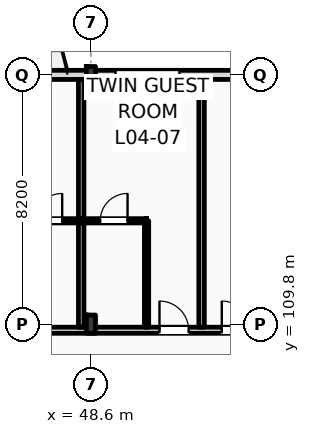
"""IFC4 building model, lengths in metres.
Left out: names, types, materials, properties, quantities, classifications, styles, units other than length and angle.
Written with IfcOpenShell. Run it as: python <this file> out.ifc"""

import sys

from ifc_helpers import new_model, si_unit, direction, frame, frame_2d, origin, origin_2d, place, context, subcontext, project, spatial, rectangle, i_section, extrude, element, fill, save


model = new_model("IFC4")
c1 = context("Model", 3, precision=1e-05, world=origin(), true_north=direction((0.0, 1.0)))
c2 = subcontext(c1, "Body", "Model", "MODEL_VIEW")
j1 = project(units=[si_unit("LENGTHUNIT", "METRE"), si_unit("PLANEANGLEUNIT", "RADIAN")], contexts=[c1])
p1 = place(None, origin())
s1 = spatial("IfcSite", under=j1, at=p1, CompositionType="ELEMENT")
p2 = place(p1, origin())
s2 = spatial("IfcBuilding", under=s1, at=p2, CompositionType="ELEMENT")
p3 = place(p2, frame((0.0, 0.0, 20.4)))
s3 = spatial("IfcBuildingStorey", under=s2, at=p3, CompositionType="ELEMENT", Elevation=20.4)
p4 = place(p3, frame((48.6, 109.8, 0.0), z_axis=(0.0, 0.0, 1.0), x_axis=(1.0, 0.0, 0.0)))
e1 = element("IfcColumn", 1, at=p4, inside=s3, PredefinedType="COLUMN", context=c2, shape_type="SweptSolid", body=[
    extrude(i_section(OverallWidth=0.3, OverallDepth=0.6, WebThickness=0.015, FlangeThickness=0.03, FilletRadius=0.027, at=origin_2d()), origin(), (0.0, 0.0, 1.0), 4.2),
])
p5 = place(p3, frame((48.6, 118.0, 0.0), z_axis=(0.0, 0.0, 1.0), x_axis=(1.0, 0.0, 0.0)))
e2 = element("IfcColumn", 2, at=p5, inside=s3, PredefinedType="COLUMN", context=c2, shape_type="SweptSolid", body=[
    extrude(i_section(OverallWidth=0.3, OverallDepth=0.55, WebThickness=0.015, FlangeThickness=0.029, FilletRadius=0.027, at=origin_2d()), origin(), (0.0, 0.0, 1.0), 4.2),
])
p6 = place(p3, frame((22.5, 118.0, 0.0), z_axis=(0.0, 0.0, 1.0), x_axis=(1.0, 0.0, 0.0)))
e3 = element("IfcWall", 3, at=p6, inside=s3, PredefinedType="STANDARD", context=c2, shape_type="SweptSolid", body=[
    extrude(rectangle(XDim=97.5, YDim=0.3, at=frame_2d((48.75, 0.0))), origin(), (0.0, 0.0, 1.0), 3.38),
])
p7 = place(p6, frame((0.91, 0.0, 0.9)))
e4 = element("IfcOpeningElement", 4, at=p7, cuts=e3, PredefinedType="OPENING", context=c2, shape_type="SweptSolid", body=[
    extrude(rectangle(XDim=0.9, YDim=1.8, at=frame_2d((0.45, 0.9))), frame((0.0, 0.16, 0.0), z_axis=(0.0, -1.0, 0.0), x_axis=(1.0, 0.0, 0.0)), (0.0, 0.0, 1.0), 0.32),
])
p8 = place(p6, frame((6.36, 0.0, 0.0)))
e5 = element("IfcOpeningElement", 5, at=p8, cuts=e3, PredefinedType="OPENING", context=c2, shape_type="SweptSolid", body=[
    extrude(rectangle(XDim=1.2, YDim=2.25, at=frame_2d((0.6, 1.125))), frame((0.0, 0.16, 0.0), z_axis=(0.0, -1.0, 0.0), x_axis=(1.0, 0.0, 0.0)), (0.0, 0.0, 1.0), 0.32),
])
p9 = place(p6, frame((11.41, 0.0, 0.9)))
e6 = element("IfcOpeningElement", 6, at=p9, cuts=e3, PredefinedType="OPENING", context=c2, shape_type="SweptSolid", body=[
    extrude(rectangle(XDim=1.1, YDim=1.9, at=frame_2d((0.55, 0.95))), frame((0.0, 0.16, 0.0), z_axis=(0.0, -1.0, 0.0), x_axis=(1.0, 0.0, 0.0)), (0.0, 0.0, 1.0), 0.32),
])
p10 = place(p6, frame((14.335, 0.0, 0.9)))
e7 = element("IfcOpeningElement", 7, at=p10, cuts=e3, PredefinedType="OPENING", context=c2, shape_type="SweptSolid", body=[
    extrude(rectangle(XDim=1.65, YDim=1.95, at=frame_2d((0.825, 0.975))), frame((0.0, 0.16, 0.0), z_axis=(0.0, -1.0, 0.0), x_axis=(1.0, 0.0, 0.0)), (0.0, 0.0, 1.0), 0.32),
])
p11 = place(p6, frame((19.26, 0.0, 0.9)))
e8 = element("IfcOpeningElement", 8, at=p11, cuts=e3, PredefinedType="OPENING", context=c2, shape_type="SweptSolid", body=[
    extrude(rectangle(XDim=1.35, YDim=2.0, at=frame_2d((0.675, 1.0))), frame((0.0, 0.16, 0.0), z_axis=(0.0, -1.0, 0.0), x_axis=(1.0, 0.0, 0.0)), (0.0, 0.0, 1.0), 0.32),
])
p12 = place(p6, frame((22.8, 0.0, 0.0)))
e9 = element("IfcOpeningElement", 9, at=p12, cuts=e3, PredefinedType="OPENING", context=c2, shape_type="SweptSolid", body=[
    extrude(rectangle(XDim=1.2, YDim=2.25, at=frame_2d((0.6, 1.125))), frame((0.0, 0.16, 0.0), z_axis=(0.0, -1.0, 0.0), x_axis=(1.0, 0.0, 0.0)), (0.0, 0.0, 1.0), 0.32),
])
p13 = place(p6, frame((26.91, 0.0, 0.9)))
e10 = element("IfcOpeningElement", 10, at=p13, cuts=e3, PredefinedType="OPENING", context=c2, shape_type="SweptSolid", body=[
    extrude(rectangle(XDim=2.1, YDim=2.1, at=frame_2d((1.05, 1.05))), frame((0.0, 0.16, 0.0), z_axis=(0.0, -1.0, 0.0), x_axis=(1.0, 0.0, 0.0)), (0.0, 0.0, 1.0), 0.32),
])
p14 = place(p6, frame((30.835, 0.0, 0.9)))
e11 = element("IfcOpeningElement", 11, at=p14, cuts=e3, PredefinedType="OPENING", context=c2, shape_type="SweptSolid", body=[
    extrude(rectangle(XDim=2.25, YDim=2.15, at=frame_2d((1.125, 1.075))), frame((0.0, 0.16, 0.0), z_axis=(0.0, -1.0, 0.0), x_axis=(1.0, 0.0, 0.0)), (0.0, 0.0, 1.0), 0.32),
])
p15 = place(p6, frame((34.96, 0.0, 0.9)))
e12 = element("IfcOpeningElement", 12, at=p15, cuts=e3, PredefinedType="OPENING", context=c2, shape_type="SweptSolid", body=[
    extrude(rectangle(XDim=2.4, YDim=2.2, at=frame_2d((1.2, 1.1))), frame((0.0, 0.16, 0.0), z_axis=(0.0, -1.0, 0.0), x_axis=(1.0, 0.0, 0.0)), (0.0, 0.0, 1.0), 0.32),
])
p16 = place(p6, frame((39.0, 0.0, 0.0)))
e13 = element("IfcOpeningElement", 13, at=p16, cuts=e3, PredefinedType="OPENING", context=c2, shape_type="SweptSolid", body=[
    extrude(rectangle(XDim=1.2, YDim=2.25, at=frame_2d((0.6, 1.125))), frame((0.0, 0.16, 0.0), z_axis=(0.0, -1.0, 0.0), x_axis=(1.0, 0.0, 0.0)), (0.0, 0.0, 1.0), 0.32),
])
p17 = place(p6, frame((43.21, 0.0, 0.9)))
e14 = element("IfcOpeningElement", 14, at=p17, cuts=e3, PredefinedType="OPENING", context=c2, shape_type="SweptSolid", body=[
    extrude(rectangle(XDim=2.7, YDim=2.3, at=frame_2d((1.35, 1.15))), frame((0.0, 0.16, 0.0), z_axis=(0.0, -1.0, 0.0), x_axis=(1.0, 0.0, 0.0)), (0.0, 0.0, 1.0), 0.32),
])
p18 = place(p6, frame((47.335, 0.0, 0.9)))
e15 = element("IfcOpeningElement", 15, at=p18, cuts=e3, PredefinedType="OPENING", context=c2, shape_type="SweptSolid", body=[
    extrude(rectangle(XDim=1.35, YDim=2.3, at=frame_2d((0.675, 1.15))), frame((0.0, 0.16, 0.0), z_axis=(0.0, -1.0, 0.0), x_axis=(1.0, 0.0, 0.0)), (0.0, 0.0, 1.0), 0.32),
])
p19 = place(p6, frame((52.74, 0.0, 0.0)))
e16 = element("IfcOpeningElement", 16, at=p19, cuts=e3, PredefinedType="OPENING", context=c2, shape_type="SweptSolid", body=[
    extrude(rectangle(XDim=1.2, YDim=2.25, at=frame_2d((0.6, 1.125))), frame((0.0, 0.16, 0.0), z_axis=(0.0, -1.0, 0.0), x_axis=(1.0, 0.0, 0.0)), (0.0, 0.0, 1.0), 0.32),
])
p20 = place(p6, frame((55.36, 0.0, 0.9)))
e17 = element("IfcOpeningElement", 17, at=p20, cuts=e3, PredefinedType="OPENING", context=c2, shape_type="SweptSolid", body=[
    extrude(rectangle(XDim=1.1, YDim=2.3, at=frame_2d((0.55, 1.15))), frame((0.0, 0.16, 0.0), z_axis=(0.0, -1.0, 0.0), x_axis=(1.0, 0.0, 0.0)), (0.0, 0.0, 1.0), 0.32),
])
p21 = place(p6, frame((59.99, 0.0, 0.9)))
e18 = element("IfcOpeningElement", 18, at=p21, cuts=e3, PredefinedType="OPENING", context=c2, shape_type="SweptSolid", body=[
    extrude(rectangle(XDim=2.74, YDim=2.3, at=frame_2d((1.37, 1.15))), frame((0.0, 0.16, 0.0), z_axis=(0.0, -1.0, 0.0), x_axis=(1.0, 0.0, 0.0)), (0.0, 0.0, 1.0), 0.32),
])
p22 = place(p6, frame((65.95, 0.0, 0.9)))
e19 = element("IfcOpeningElement", 19, at=p22, cuts=e3, PredefinedType="OPENING", context=c2, shape_type="SweptSolid", body=[
    extrude(rectangle(XDim=1.35, YDim=2.3, at=frame_2d((0.675, 1.15))), frame((0.0, 0.16, 0.0), z_axis=(0.0, -1.0, 0.0), x_axis=(1.0, 0.0, 0.0)), (0.0, 0.0, 1.0), 0.32),
])
p23 = place(p6, frame((69.16, 0.0, 0.0)))
e20 = element("IfcOpeningElement", 20, at=p23, cuts=e3, PredefinedType="OPENING", context=c2, shape_type="SweptSolid", body=[
    extrude(rectangle(XDim=1.2, YDim=2.25, at=frame_2d((0.6, 1.125))), frame((0.0, 0.16, 0.0), z_axis=(0.0, -1.0, 0.0), x_axis=(1.0, 0.0, 0.0)), (0.0, 0.0, 1.0), 0.32),
])
p24 = place(p6, frame((73.75, 0.0, 0.9)))
e21 = element("IfcOpeningElement", 21, at=p24, cuts=e3, PredefinedType="OPENING", context=c2, shape_type="SweptSolid", body=[
    extrude(rectangle(XDim=1.8, YDim=2.3, at=frame_2d((0.9, 1.15))), frame((0.0, 0.16, 0.0), z_axis=(0.0, -1.0, 0.0), x_axis=(1.0, 0.0, 0.0)), (0.0, 0.0, 1.0), 0.32),
])
p25 = place(p6, frame((76.79, 0.0, 0.9)))
e22 = element("IfcOpeningElement", 22, at=p25, cuts=e3, PredefinedType="OPENING", context=c2, shape_type="SweptSolid", body=[
    extrude(rectangle(XDim=2.74, YDim=2.3, at=frame_2d((1.37, 1.15))), frame((0.0, 0.16, 0.0), z_axis=(0.0, -1.0, 0.0), x_axis=(1.0, 0.0, 0.0)), (0.0, 0.0, 1.0), 0.32),
])
p26 = place(p6, frame((81.55, 0.0, 0.9)))
e23 = element("IfcOpeningElement", 23, at=p26, cuts=e3, PredefinedType="OPENING", context=c2, shape_type="SweptSolid", body=[
    extrude(rectangle(XDim=1.8, YDim=2.3, at=frame_2d((0.9, 1.15))), frame((0.0, 0.16, 0.0), z_axis=(0.0, -1.0, 0.0), x_axis=(1.0, 0.0, 0.0)), (0.0, 0.0, 1.0), 0.32),
])
p27 = place(p6, frame((86.01, 0.0, 0.9)))
e24 = element("IfcOpeningElement", 24, at=p27, cuts=e3, PredefinedType="OPENING", context=c2, shape_type="SweptSolid", body=[
    extrude(rectangle(XDim=1.1, YDim=1.5, at=frame_2d((0.55, 0.75))), frame((0.0, 0.16, 0.0), z_axis=(0.0, -1.0, 0.0), x_axis=(1.0, 0.0, 0.0)), (0.0, 0.0, 1.0), 0.32),
])
p28 = place(p6, frame((90.135, 0.0, 0.9)))
e25 = element("IfcOpeningElement", 25, at=p28, cuts=e3, PredefinedType="OPENING", context=c2, shape_type="SweptSolid", body=[
    extrude(rectangle(XDim=1.25, YDim=1.6, at=frame_2d((0.625, 0.8))), frame((0.0, 0.16, 0.0), z_axis=(0.0, -1.0, 0.0), x_axis=(1.0, 0.0, 0.0)), (0.0, 0.0, 1.0), 0.32),
])
p29 = place(p6, frame((94.34, 0.0, 0.9)))
e26 = element("IfcOpeningElement", 26, at=p29, cuts=e3, PredefinedType="OPENING", context=c2, shape_type="SweptSolid", body=[
    extrude(rectangle(XDim=1.4, YDim=1.7, at=frame_2d((0.7, 0.85))), frame((0.0, 0.16, 0.0), z_axis=(0.0, -1.0, 0.0), x_axis=(1.0, 0.0, 0.0)), (0.0, 0.0, 1.0), 0.32),
])
p30 = place(p3, frame((10.65, 109.6, 0.0), z_axis=(0.0, 0.0, 1.0), x_axis=(1.0, 0.0, 0.0)))
e27 = element("IfcWall", 27, at=p30, inside=s3, PredefinedType="PARTITIONING", context=c2, shape_type="SweptSolid", body=[
    extrude(rectangle(XDim=109.21, YDim=0.2, at=frame_2d((54.605, 0.0))), origin(), (0.0, 0.0, 1.0), 3.38),
])
p31 = place(p30, frame((12.535, 0.0, 0.0)))
e28 = element("IfcOpeningElement", 28, at=p31, cuts=e27, PredefinedType="OPENING", context=c2, shape_type="SweptSolid", body=[
    extrude(rectangle(XDim=1.02, YDim=2.2, at=frame_2d((0.51, 1.1))), frame((0.0, 0.11, 0.0), z_axis=(0.0, -1.0, 0.0), x_axis=(1.0, 0.0, 0.0)), (0.0, 0.0, 1.0), 0.22),
])
p32 = place(p30, frame((19.175, 0.0, 0.0)))
e29 = element("IfcOpeningElement", 29, at=p32, cuts=e27, PredefinedType="OPENING", context=c2, shape_type="SweptSolid", body=[
    extrude(rectangle(XDim=1.02, YDim=2.2, at=frame_2d((0.51, 1.1))), frame((0.0, 0.11, 0.0), z_axis=(0.0, -1.0, 0.0), x_axis=(1.0, 0.0, 0.0)), (0.0, 0.0, 1.0), 0.22),
])
p33 = place(p30, frame((23.375, 0.0, 0.0)))
e30 = element("IfcOpeningElement", 30, at=p33, cuts=e27, PredefinedType="OPENING", context=c2, shape_type="SweptSolid", body=[
    extrude(rectangle(XDim=1.02, YDim=2.2, at=frame_2d((0.51, 1.1))), frame((0.0, 0.11, 0.0), z_axis=(0.0, -1.0, 0.0), x_axis=(1.0, 0.0, 0.0)), (0.0, 0.0, 1.0), 0.22),
])
p34 = place(p30, frame((27.575, 0.0, 0.0)))
e31 = element("IfcOpeningElement", 31, at=p34, cuts=e27, PredefinedType="OPENING", context=c2, shape_type="SweptSolid", body=[
    extrude(rectangle(XDim=1.02, YDim=2.2, at=frame_2d((0.51, 1.1))), frame((0.0, 0.11, 0.0), z_axis=(0.0, -1.0, 0.0), x_axis=(1.0, 0.0, 0.0)), (0.0, 0.0, 1.0), 0.22),
])
p35 = place(p30, frame((31.805, 0.0, 0.0)))
e32 = element("IfcOpeningElement", 32, at=p35, cuts=e27, PredefinedType="OPENING", context=c2, shape_type="SweptSolid", body=[
    extrude(rectangle(XDim=0.96, YDim=2.2, at=frame_2d((0.48, 1.1))), frame((0.0, 0.11, 0.0), z_axis=(0.0, -1.0, 0.0), x_axis=(1.0, 0.0, 0.0)), (0.0, 0.0, 1.0), 0.22),
])
p36 = place(p30, frame((33.855, 0.0, 0.0)))
e33 = element("IfcOpeningElement", 33, at=p36, cuts=e27, PredefinedType="OPENING", context=c2, shape_type="SweptSolid", body=[
    extrude(rectangle(XDim=0.96, YDim=2.2, at=frame_2d((0.48, 1.1))), frame((0.0, 0.11, 0.0), z_axis=(0.0, -1.0, 0.0), x_axis=(1.0, 0.0, 0.0)), (0.0, 0.0, 1.0), 0.22),
])
p37 = place(p30, frame((40.205, 0.0, 0.0)))
e34 = element("IfcOpeningElement", 34, at=p37, cuts=e27, PredefinedType="OPENING", context=c2, shape_type="SweptSolid", body=[
    extrude(rectangle(XDim=0.96, YDim=2.2, at=frame_2d((0.48, 1.1))), frame((0.0, 0.11, 0.0), z_axis=(0.0, -1.0, 0.0), x_axis=(1.0, 0.0, 0.0)), (0.0, 0.0, 1.0), 0.22),
])
p38 = place(p30, frame((42.255, 0.0, 0.0)))
e35 = element("IfcOpeningElement", 35, at=p38, cuts=e27, PredefinedType="OPENING", context=c2, shape_type="SweptSolid", body=[
    extrude(rectangle(XDim=0.96, YDim=2.2, at=frame_2d((0.48, 1.1))), frame((0.0, 0.11, 0.0), z_axis=(0.0, -1.0, 0.0), x_axis=(1.0, 0.0, 0.0)), (0.0, 0.0, 1.0), 0.22),
])
p39 = place(p30, frame((48.605, 0.0, 0.0)))
e36 = element("IfcOpeningElement", 36, at=p39, cuts=e27, PredefinedType="OPENING", context=c2, shape_type="SweptSolid", body=[
    extrude(rectangle(XDim=0.96, YDim=2.2, at=frame_2d((0.48, 1.1))), frame((0.0, 0.11, 0.0), z_axis=(0.0, -1.0, 0.0), x_axis=(1.0, 0.0, 0.0)), (0.0, 0.0, 1.0), 0.22),
])
p40 = place(p30, frame((50.655, 0.0, 0.0)))
e37 = element("IfcOpeningElement", 37, at=p40, cuts=e27, PredefinedType="OPENING", context=c2, shape_type="SweptSolid", body=[
    extrude(rectangle(XDim=0.96, YDim=2.2, at=frame_2d((0.48, 1.1))), frame((0.0, 0.11, 0.0), z_axis=(0.0, -1.0, 0.0), x_axis=(1.0, 0.0, 0.0)), (0.0, 0.0, 1.0), 0.22),
])
p41 = place(p30, frame((57.005, 0.0, 0.0)))
e38 = element("IfcOpeningElement", 38, at=p41, cuts=e27, PredefinedType="OPENING", context=c2, shape_type="SweptSolid", body=[
    extrude(rectangle(XDim=0.96, YDim=2.2, at=frame_2d((0.48, 1.1))), frame((0.0, 0.11, 0.0), z_axis=(0.0, -1.0, 0.0), x_axis=(1.0, 0.0, 0.0)), (0.0, 0.0, 1.0), 0.22),
])
p42 = place(p30, frame((59.055, 0.0, 0.0)))
e39 = element("IfcOpeningElement", 39, at=p42, cuts=e27, PredefinedType="OPENING", context=c2, shape_type="SweptSolid", body=[
    extrude(rectangle(XDim=0.96, YDim=2.2, at=frame_2d((0.48, 1.1))), frame((0.0, 0.11, 0.0), z_axis=(0.0, -1.0, 0.0), x_axis=(1.0, 0.0, 0.0)), (0.0, 0.0, 1.0), 0.22),
])
p43 = place(p30, frame((65.405, 0.0, 0.0)))
e40 = element("IfcOpeningElement", 40, at=p43, cuts=e27, PredefinedType="OPENING", context=c2, shape_type="SweptSolid", body=[
    extrude(rectangle(XDim=0.96, YDim=2.2, at=frame_2d((0.48, 1.1))), frame((0.0, 0.11, 0.0), z_axis=(0.0, -1.0, 0.0), x_axis=(1.0, 0.0, 0.0)), (0.0, 0.0, 1.0), 0.22),
])
p44 = place(p30, frame((67.205, 0.0, 0.0)))
e41 = element("IfcOpeningElement", 41, at=p44, cuts=e27, PredefinedType="OPENING", context=c2, shape_type="SweptSolid", body=[
    extrude(rectangle(XDim=0.96, YDim=2.2, at=frame_2d((0.48, 1.1))), frame((0.0, 0.11, 0.0), z_axis=(0.0, -1.0, 0.0), x_axis=(1.0, 0.0, 0.0)), (0.0, 0.0, 1.0), 0.22),
])
p45 = place(p30, frame((73.805, 0.0, 0.0)))
e42 = element("IfcOpeningElement", 42, at=p45, cuts=e27, PredefinedType="OPENING", context=c2, shape_type="SweptSolid", body=[
    extrude(rectangle(XDim=0.96, YDim=2.2, at=frame_2d((0.48, 1.1))), frame((0.0, 0.11, 0.0), z_axis=(0.0, -1.0, 0.0), x_axis=(1.0, 0.0, 0.0)), (0.0, 0.0, 1.0), 0.22),
])
p46 = place(p30, frame((78.255, 0.0, 0.0)))
e43 = element("IfcOpeningElement", 43, at=p46, cuts=e27, PredefinedType="OPENING", context=c2, shape_type="SweptSolid", body=[
    extrude(rectangle(XDim=0.96, YDim=2.2, at=frame_2d((0.48, 1.1))), frame((0.0, 0.11, 0.0), z_axis=(0.0, -1.0, 0.0), x_axis=(1.0, 0.0, 0.0)), (0.0, 0.0, 1.0), 0.22),
])
p47 = place(p30, frame((82.205, 0.0, 0.0)))
e44 = element("IfcOpeningElement", 44, at=p47, cuts=e27, PredefinedType="OPENING", context=c2, shape_type="SweptSolid", body=[
    extrude(rectangle(XDim=0.96, YDim=2.2, at=frame_2d((0.48, 1.1))), frame((0.0, 0.11, 0.0), z_axis=(0.0, -1.0, 0.0), x_axis=(1.0, 0.0, 0.0)), (0.0, 0.0, 1.0), 0.22),
])
p48 = place(p30, frame((86.405, 0.0, 0.0)))
e45 = element("IfcOpeningElement", 45, at=p48, cuts=e27, PredefinedType="OPENING", context=c2, shape_type="SweptSolid", body=[
    extrude(rectangle(XDim=0.96, YDim=2.2, at=frame_2d((0.48, 1.1))), frame((0.0, 0.11, 0.0), z_axis=(0.0, -1.0, 0.0), x_axis=(1.0, 0.0, 0.0)), (0.0, 0.0, 1.0), 0.22),
])
p49 = place(p30, frame((90.605, 0.0, 0.0)))
e46 = element("IfcOpeningElement", 46, at=p49, cuts=e27, PredefinedType="OPENING", context=c2, shape_type="SweptSolid", body=[
    extrude(rectangle(XDim=0.96, YDim=2.2, at=frame_2d((0.48, 1.1))), frame((0.0, 0.11, 0.0), z_axis=(0.0, -1.0, 0.0), x_axis=(1.0, 0.0, 0.0)), (0.0, 0.0, 1.0), 0.22),
])
p50 = place(p30, frame((94.805, 0.0, 0.0)))
e47 = element("IfcOpeningElement", 47, at=p50, cuts=e27, PredefinedType="OPENING", context=c2, shape_type="SweptSolid", body=[
    extrude(rectangle(XDim=0.96, YDim=2.2, at=frame_2d((0.48, 1.1))), frame((0.0, 0.11, 0.0), z_axis=(0.0, -1.0, 0.0), x_axis=(1.0, 0.0, 0.0)), (0.0, 0.0, 1.0), 0.22),
])
p51 = place(p30, frame((99.005, 0.0, 0.0)))
e48 = element("IfcOpeningElement", 48, at=p51, cuts=e27, PredefinedType="OPENING", context=c2, shape_type="SweptSolid", body=[
    extrude(rectangle(XDim=0.96, YDim=2.2, at=frame_2d((0.48, 1.1))), frame((0.0, 0.11, 0.0), z_axis=(0.0, -1.0, 0.0), x_axis=(1.0, 0.0, 0.0)), (0.0, 0.0, 1.0), 0.22),
])
p52 = place(p30, frame((103.205, 0.0, 0.0)))
e49 = element("IfcOpeningElement", 49, at=p52, cuts=e27, PredefinedType="OPENING", context=c2, shape_type="SweptSolid", body=[
    extrude(rectangle(XDim=0.96, YDim=2.2, at=frame_2d((0.48, 1.1))), frame((0.0, 0.11, 0.0), z_axis=(0.0, -1.0, 0.0), x_axis=(1.0, 0.0, 0.0)), (0.0, 0.0, 1.0), 0.22),
])
p53 = place(p30, frame((105.335, 0.0, 0.0)))
e50 = element("IfcOpeningElement", 50, at=p53, cuts=e27, PredefinedType="OPENING", context=c2, shape_type="SweptSolid", body=[
    extrude(rectangle(XDim=0.96, YDim=2.2, at=frame_2d((0.48, 1.1))), frame((0.0, 0.11, 0.0), z_axis=(0.0, -1.0, 0.0), x_axis=(1.0, 0.0, 0.0)), (0.0, 0.0, 1.0), 0.22),
])
p54 = place(p30, frame((2.716, 0.0, 0.0)))
e51 = element("IfcOpeningElement", 51, at=p54, cuts=e27, PredefinedType="OPENING", context=c2, shape_type="SweptSolid", body=[
    extrude(rectangle(XDim=1.35, YDim=2.25, at=frame_2d((0.675, 1.125))), frame((0.0, 0.11, 0.0), z_axis=(0.0, -1.0, 0.0), x_axis=(1.0, 0.0, 0.0)), (0.0, 0.0, 1.0), 0.22),
])
p55 = place(p30, frame((6.65, 0.0, 0.0)))
e52 = element("IfcOpeningElement", 52, at=p55, cuts=e27, PredefinedType="OPENING", context=c2, shape_type="SweptSolid", body=[
    extrude(rectangle(XDim=1.35, YDim=2.25, at=frame_2d((0.675, 1.125))), frame((0.0, 0.11, 0.0), z_axis=(0.0, -1.0, 0.0), x_axis=(1.0, 0.0, 0.0)), (0.0, 0.0, 1.0), 0.22),
])
p56 = place(p30, frame((10.583, 0.0, 0.0)))
e53 = element("IfcOpeningElement", 53, at=p56, cuts=e27, PredefinedType="OPENING", context=c2, shape_type="SweptSolid", body=[
    extrude(rectangle(XDim=1.35, YDim=2.25, at=frame_2d((0.675, 1.125))), frame((0.0, 0.11, 0.0), z_axis=(0.0, -1.0, 0.0), x_axis=(1.0, 0.0, 0.0)), (0.0, 0.0, 1.0), 0.22),
])
p57 = place(p3, frame((48.28, 109.7, 0.0), z_axis=(0.0, 0.0, 1.0), x_axis=(0.0, 1.0, 0.0)))
e54 = element("IfcWall", 54, at=p57, inside=s3, PredefinedType="PARTITIONING", context=c2, shape_type="SweptSolid", body=[
    extrude(rectangle(XDim=8.15, YDim=0.18, at=frame_2d((4.075, 0.0))), origin(), (0.0, 0.0, 1.0), 3.94),
])
p58 = place(p3, frame((46.13, 113.2, 0.0), z_axis=(0.0, 0.0, 1.0), x_axis=(1.0, 0.0, 0.0)))
e55 = element("IfcWall", 55, at=p58, inside=s3, PredefinedType="PARTITIONING", context=c2, shape_type="SweptSolid", body=[
    extrude(rectangle(XDim=2.15, YDim=0.14, at=frame_2d((1.075, 0.0))), origin(), (0.0, 0.0, 1.0), 3.94),
])
p59 = place(p58, frame((0.625, 0.0, 0.0)))
e56 = element("IfcOpeningElement", 56, at=p59, cuts=e55, PredefinedType="OPENING", context=c2, shape_type="SweptSolid", body=[
    extrude(rectangle(XDim=0.9, YDim=2.1, at=frame_2d((0.45, 1.05))), frame((0.0, 0.08, 0.0), z_axis=(0.0, -1.0, 0.0), x_axis=(1.0, 0.0, 0.0)), (0.0, 0.0, 1.0), 0.16),
])
p60 = place(p3, frame((52.24, 109.7, 0.0), z_axis=(0.0, 0.0, 1.0), x_axis=(0.0, 1.0, 0.0)))
e57 = element("IfcWall", 57, at=p60, inside=s3, PredefinedType="PARTITIONING", context=c2, shape_type="SweptSolid", body=[
    extrude(rectangle(XDim=8.15, YDim=0.18, at=frame_2d((4.075, 0.0))), origin(), (0.0, 0.0, 1.0), 3.94),
])
p61 = place(p3, frame((50.43, 109.7, 0.0), z_axis=(0.0, 0.0, 1.0), x_axis=(0.0, 1.0, 0.0)))
e58 = element("IfcWall", 58, at=p61, inside=s3, PredefinedType="PARTITIONING", context=c2, shape_type="SweptSolid", body=[
    extrude(rectangle(XDim=3.5, YDim=0.14, at=frame_2d((1.75, 0.0))), origin(), (0.0, 0.0, 1.0), 3.94),
])
p62 = place(p3, frame((48.28, 113.2, 0.0), z_axis=(0.0, 0.0, 1.0), x_axis=(1.0, 0.0, 0.0)))
e59 = element("IfcWall", 59, at=p62, inside=s3, PredefinedType="PARTITIONING", context=c2, shape_type="SweptSolid", body=[
    extrude(rectangle(XDim=2.15, YDim=0.14, at=frame_2d((1.075, 0.0))), origin(), (0.0, 0.0, 1.0), 3.94),
])
p63 = place(p62, frame((0.625, 0.0, 0.0)))
e60 = element("IfcOpeningElement", 60, at=p63, cuts=e59, PredefinedType="OPENING", context=c2, shape_type="SweptSolid", body=[
    extrude(rectangle(XDim=0.9, YDim=2.1, at=frame_2d((0.45, 1.05))), frame((0.0, 0.08, 0.0), z_axis=(0.0, -1.0, 0.0), x_axis=(1.0, 0.0, 0.0)), (0.0, 0.0, 1.0), 0.16),
])
p64 = place(p13, origin())
e61 = element("IfcWindow", 61, at=p64, inside=s3, PartitioningType="DOUBLE_PANEL_VERTICAL", PredefinedType="WINDOW", context=c2, shape_type="SweptSolid", body=[
    extrude(rectangle(XDim=2.1, YDim=2.1, at=frame_2d((1.05, 1.05))), frame((0.0, 0.03, 0.0), z_axis=(0.0, -1.0, 0.0), x_axis=(1.0, 0.0, 0.0)), (0.0, 0.0, 1.0), 0.06),
])
fill(e10, e61)
p65 = place(p59, origin())
e62 = element("IfcDoor", 62, at=p65, inside=s3, OperationType="SINGLE_SWING_RIGHT", PredefinedType="DOOR", context=c2, shape_type="SweptSolid", body=[
    extrude(rectangle(XDim=0.9, YDim=2.1, at=frame_2d((0.45, 1.05))), frame((0.0, 0.025, 0.0), z_axis=(0.0, -1.0, 0.0), x_axis=(1.0, 0.0, 0.0)), (0.0, 0.0, 1.0), 0.05),
])
fill(e56, e62)
p66 = place(p37, origin())
e63 = element("IfcDoor", 63, at=p66, inside=s3, OperationType="SINGLE_SWING_LEFT", PredefinedType="DOOR", context=c2, shape_type="SweptSolid", body=[
    extrude(rectangle(XDim=0.96, YDim=2.2, at=frame_2d((0.48, 1.1))), frame((0.0, 0.025, 0.0), z_axis=(0.0, -1.0, 0.0), x_axis=(1.0, 0.0, 0.0)), (0.0, 0.0, 1.0), 0.05),
])
fill(e34, e63)
p67 = place(p63, origin())
e64 = element("IfcDoor", 64, at=p67, inside=s3, OperationType="SINGLE_SWING_RIGHT", PredefinedType="DOOR", context=c2, shape_type="SweptSolid", body=[
    extrude(rectangle(XDim=0.9, YDim=2.1, at=frame_2d((0.45, 1.05))), frame((0.0, 0.025, 0.0), z_axis=(0.0, -1.0, 0.0), x_axis=(1.0, 0.0, 0.0)), (0.0, 0.0, 1.0), 0.05),
])
fill(e60, e64)
p68 = place(p38, origin())
e65 = element("IfcDoor", 65, at=p68, inside=s3, OperationType="SINGLE_SWING_LEFT", PredefinedType="DOOR", context=c2, shape_type="SweptSolid", body=[
    extrude(rectangle(XDim=0.96, YDim=2.2, at=frame_2d((0.48, 1.1))), frame((0.0, 0.025, 0.0), z_axis=(0.0, -1.0, 0.0), x_axis=(1.0, 0.0, 0.0)), (0.0, 0.0, 1.0), 0.05),
])
fill(e35, e65)
save(model, sys.argv[1])
